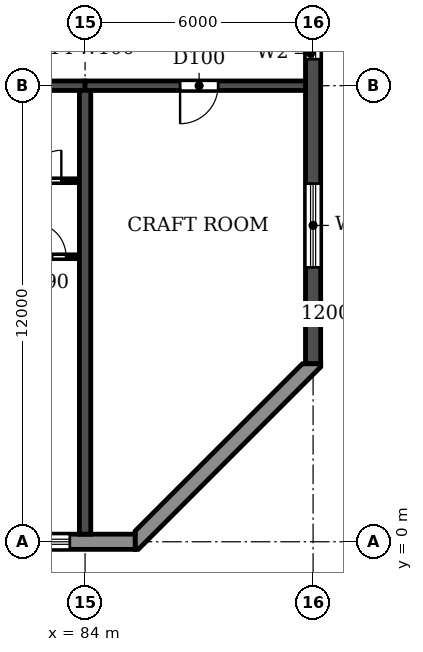
"""IFC4 building model, lengths in metres.
Left out: names, types, materials, properties, quantities, classifications, styles, units other than length and angle.
Written with IfcOpenShell. Run it as: python <this file> out.ifc"""

import sys

from ifc_helpers import new_model, si_unit, direction, frame, frame_2d, origin, place, context, subcontext, project, spatial, polyline, rectangle, outline, extrude, element, fill, save


model = new_model("IFC4")
c1 = context("Model", 3, precision=1e-05, world=origin(), true_north=direction((0.0, 1.0)))
c2 = subcontext(c1, "Body", "Model", "MODEL_VIEW")
j1 = project(units=[si_unit("LENGTHUNIT", "METRE"), si_unit("PLANEANGLEUNIT", "RADIAN")], contexts=[c1])
p1 = place(None, origin())
s1 = spatial("IfcSite", under=j1, at=p1, CompositionType="ELEMENT")
p2 = place(p1, origin())
s2 = spatial("IfcBuilding", under=s1, at=p2, CompositionType="ELEMENT")
p3 = place(p2, frame((0.0, 0.0, 125.7)))
s3 = spatial("IfcBuildingStorey", under=s2, at=p3, CompositionType="ELEMENT", Elevation=125.7)
p4 = place(p3, frame((84.0, 0.2, 0.0), z_axis=(0.0, 0.0, 1.0), x_axis=(0.0, 1.0, 0.0)))
e1 = element("IfcWall", 1, at=p4, inside=s3, PredefinedType="SHEAR", context=c2, shape_type="SweptSolid", body=[
    extrude(rectangle(XDim=11.675, YDim=0.3, at=frame_2d((5.837, 0.0))), origin(), (0.0, 0.0, 1.0), 3.07),
])
p5 = place(p3, frame((90.0, 4.683, 0.0), z_axis=(0.0, 0.0, 1.0), x_axis=(0.0, 1.0, 0.0)))
e2 = element("IfcWall", 2, at=p5, inside=s3, PredefinedType="SHEAR", context=c2, shape_type="SweptSolid", body=[
    extrude(rectangle(XDim=33.034, YDim=0.4, at=frame_2d((16.517, 0.0))), origin(), (0.0, 0.0, 1.0), 3.07),
])
p6 = place(p5, frame((23.817, 0.0, 0.9)))
e3 = element("IfcOpeningElement", 3, at=p6, cuts=e2, PredefinedType="OPENING", context=c2, shape_type="SweptSolid", body=[
    extrude(rectangle(XDim=1.2, YDim=1.5, at=frame_2d((0.6, 0.75))), frame((0.0, 0.21, 0.0), z_axis=(0.0, -1.0, 0.0), x_axis=(1.0, 0.0, 0.0)), (0.0, 0.0, 1.0), 0.42),
])
p7 = place(p5, frame((8.017, 0.0, 0.9)))
e4 = element("IfcOpeningElement", 4, at=p7, cuts=e2, PredefinedType="OPENING", context=c2, shape_type="SweptSolid", body=[
    extrude(rectangle(XDim=1.2, YDim=1.5, at=frame_2d((0.6, 0.75))), frame((0.0, 0.21, 0.0), z_axis=(0.0, -1.0, 0.0), x_axis=(1.0, 0.0, 0.0)), (0.0, 0.0, 1.0), 0.42),
])
p8 = place(p5, frame((28.293, 0.0, 0.6)))
e5 = element("IfcOpeningElement", 5, at=p8, cuts=e2, PredefinedType="OPENING", context=c2, shape_type="SweptSolid", body=[
    extrude(rectangle(XDim=2.2, YDim=1.8, at=frame_2d((1.1, 0.9))), frame((0.0, 0.21, 0.0), z_axis=(0.0, -1.0, 0.0), x_axis=(1.0, 0.0, 0.0)), (0.0, 0.0, 1.0), 0.42),
])
p9 = place(p5, frame((2.541, 0.0, 0.6)))
e6 = element("IfcOpeningElement", 6, at=p9, cuts=e2, PredefinedType="OPENING", context=c2, shape_type="SweptSolid", body=[
    extrude(rectangle(XDim=2.2, YDim=1.8, at=frame_2d((1.1, 0.9))), frame((0.0, 0.21, 0.0), z_axis=(0.0, -1.0, 0.0), x_axis=(1.0, 0.0, 0.0)), (0.0, 0.0, 1.0), 0.42),
])
p10 = place(p3, frame((78.0, 12.0, 0.0), z_axis=(0.0, 0.0, 1.0), x_axis=(1.0, 0.0, 0.0)))
e7 = element("IfcWall", 7, at=p10, inside=s3, PredefinedType="SHEAR", context=c2, shape_type="SweptSolid", body=[
    extrude(rectangle(XDim=6.0, YDim=0.25, at=frame_2d((3.0, 0.0))), origin(), (0.0, 0.0, 1.0), 2.47),
])
p11 = place(p10, frame((2.55, 0.0, 0.0)))
e8 = element("IfcOpeningElement", 8, at=p11, cuts=e7, PredefinedType="OPENING", context=c2, shape_type="SweptSolid", body=[
    extrude(rectangle(XDim=1.0, YDim=2.1, at=frame_2d((0.5, 1.05))), frame((0.0, 0.135, 0.0), z_axis=(0.0, -1.0, 0.0), x_axis=(1.0, 0.0, 0.0)), (0.0, 0.0, 1.0), 0.27),
])
p12 = place(p3, frame((84.0, 12.0, 0.0), z_axis=(0.0, 0.0, 1.0), x_axis=(1.0, 0.0, 0.0)))
e9 = element("IfcWall", 9, at=p12, inside=s3, PredefinedType="SHEAR", context=c2, shape_type="SweptSolid", body=[
    extrude(rectangle(XDim=5.8, YDim=0.25, at=frame_2d((2.9, 0.0))), origin(), (0.0, 0.0, 1.0), 2.47),
])
p13 = place(p12, frame((2.5, 0.0, 0.0)))
e10 = element("IfcOpeningElement", 10, at=p13, cuts=e9, PredefinedType="OPENING", context=c2, shape_type="SweptSolid", body=[
    extrude(rectangle(XDim=1.0, YDim=2.1, at=frame_2d((0.5, 1.05))), frame((0.0, 0.135, 0.0), z_axis=(0.0, -1.0, 0.0), x_axis=(1.0, 0.0, 0.0)), (0.0, 0.0, 1.0), 0.27),
])
p14 = place(p3, frame((16.683, 0.0, 0.0), z_axis=(0.0, 0.0, 1.0), x_axis=(1.0, 0.0, 0.0)))
e11 = element("IfcWall", 11, at=p14, inside=s3, PredefinedType="STANDARD", context=c2, shape_type="SweptSolid", body=[
    extrude(rectangle(XDim=68.634, YDim=0.4, at=frame_2d((34.317, 0.0))), origin(), (0.0, 0.0, 1.0), 3.07),
])
p15 = place(p14, frame((1.717, 0.0, 0.9)))
e12 = element("IfcOpeningElement", 12, at=p15, cuts=e11, PredefinedType="OPENING", context=c2, shape_type="SweptSolid", body=[
    extrude(rectangle(XDim=2.2, YDim=1.5, at=frame_2d((1.1, 0.75))), frame((0.0, 0.21, 0.0), z_axis=(0.0, -1.0, 0.0), x_axis=(1.0, 0.0, 0.0)), (0.0, 0.0, 1.0), 0.42),
])
p16 = place(p14, frame((4.717, 0.0, 0.9)))
e13 = element("IfcOpeningElement", 13, at=p16, cuts=e11, PredefinedType="OPENING", context=c2, shape_type="SweptSolid", body=[
    extrude(rectangle(XDim=2.2, YDim=1.5, at=frame_2d((1.1, 0.75))), frame((0.0, 0.21, 0.0), z_axis=(0.0, -1.0, 0.0), x_axis=(1.0, 0.0, 0.0)), (0.0, 0.0, 1.0), 0.42),
])
p17 = place(p14, frame((7.717, 0.0, 0.9)))
e14 = element("IfcOpeningElement", 14, at=p17, cuts=e11, PredefinedType="OPENING", context=c2, shape_type="SweptSolid", body=[
    extrude(rectangle(XDim=2.2, YDim=1.5, at=frame_2d((1.1, 0.75))), frame((0.0, 0.21, 0.0), z_axis=(0.0, -1.0, 0.0), x_axis=(1.0, 0.0, 0.0)), (0.0, 0.0, 1.0), 0.42),
])
p18 = place(p14, frame((10.717, 0.0, 0.9)))
e15 = element("IfcOpeningElement", 15, at=p18, cuts=e11, PredefinedType="OPENING", context=c2, shape_type="SweptSolid", body=[
    extrude(rectangle(XDim=2.2, YDim=1.5, at=frame_2d((1.1, 0.75))), frame((0.0, 0.21, 0.0), z_axis=(0.0, -1.0, 0.0), x_axis=(1.0, 0.0, 0.0)), (0.0, 0.0, 1.0), 0.42),
])
p19 = place(p14, frame((13.717, 0.0, 0.9)))
e16 = element("IfcOpeningElement", 16, at=p19, cuts=e11, PredefinedType="OPENING", context=c2, shape_type="SweptSolid", body=[
    extrude(rectangle(XDim=2.2, YDim=1.5, at=frame_2d((1.1, 0.75))), frame((0.0, 0.21, 0.0), z_axis=(0.0, -1.0, 0.0), x_axis=(1.0, 0.0, 0.0)), (0.0, 0.0, 1.0), 0.42),
])
p20 = place(p14, frame((16.717, 0.0, 0.9)))
e17 = element("IfcOpeningElement", 17, at=p20, cuts=e11, PredefinedType="OPENING", context=c2, shape_type="SweptSolid", body=[
    extrude(rectangle(XDim=2.2, YDim=1.5, at=frame_2d((1.1, 0.75))), frame((0.0, 0.21, 0.0), z_axis=(0.0, -1.0, 0.0), x_axis=(1.0, 0.0, 0.0)), (0.0, 0.0, 1.0), 0.42),
])
p21 = place(p14, frame((19.717, 0.0, 0.9)))
e18 = element("IfcOpeningElement", 18, at=p21, cuts=e11, PredefinedType="OPENING", context=c2, shape_type="SweptSolid", body=[
    extrude(rectangle(XDim=2.2, YDim=1.5, at=frame_2d((1.1, 0.75))), frame((0.0, 0.21, 0.0), z_axis=(0.0, -1.0, 0.0), x_axis=(1.0, 0.0, 0.0)), (0.0, 0.0, 1.0), 0.42),
])
p22 = place(p14, frame((22.917, 0.0, 0.0)))
e19 = element("IfcOpeningElement", 19, at=p22, cuts=e11, PredefinedType="OPENING", context=c2, shape_type="SweptSolid", body=[
    extrude(rectangle(XDim=1.8, YDim=2.4, at=frame_2d((0.9, 1.2))), frame((0.0, 0.21, 0.0), z_axis=(0.0, -1.0, 0.0), x_axis=(1.0, 0.0, 0.0)), (0.0, 0.0, 1.0), 0.42),
])
p23 = place(p14, frame((25.717, 0.0, 0.9)))
e20 = element("IfcOpeningElement", 20, at=p23, cuts=e11, PredefinedType="OPENING", context=c2, shape_type="SweptSolid", body=[
    extrude(rectangle(XDim=2.2, YDim=1.5, at=frame_2d((1.1, 0.75))), frame((0.0, 0.21, 0.0), z_axis=(0.0, -1.0, 0.0), x_axis=(1.0, 0.0, 0.0)), (0.0, 0.0, 1.0), 0.42),
])
p24 = place(p14, frame((28.717, 0.0, 0.9)))
e21 = element("IfcOpeningElement", 21, at=p24, cuts=e11, PredefinedType="OPENING", context=c2, shape_type="SweptSolid", body=[
    extrude(rectangle(XDim=2.2, YDim=1.5, at=frame_2d((1.1, 0.75))), frame((0.0, 0.21, 0.0), z_axis=(0.0, -1.0, 0.0), x_axis=(1.0, 0.0, 0.0)), (0.0, 0.0, 1.0), 0.42),
])
p25 = place(p14, frame((31.717, 0.0, 0.9)))
e22 = element("IfcOpeningElement", 22, at=p25, cuts=e11, PredefinedType="OPENING", context=c2, shape_type="SweptSolid", body=[
    extrude(rectangle(XDim=2.2, YDim=1.5, at=frame_2d((1.1, 0.75))), frame((0.0, 0.21, 0.0), z_axis=(0.0, -1.0, 0.0), x_axis=(1.0, 0.0, 0.0)), (0.0, 0.0, 1.0), 0.42),
])
p26 = place(p14, frame((34.917, 0.0, 0.0)))
e23 = element("IfcOpeningElement", 23, at=p26, cuts=e11, PredefinedType="OPENING", context=c2, shape_type="SweptSolid", body=[
    extrude(rectangle(XDim=1.8, YDim=2.4, at=frame_2d((0.9, 1.2))), frame((0.0, 0.21, 0.0), z_axis=(0.0, -1.0, 0.0), x_axis=(1.0, 0.0, 0.0)), (0.0, 0.0, 1.0), 0.42),
])
p27 = place(p14, frame((37.717, 0.0, 0.9)))
e24 = element("IfcOpeningElement", 24, at=p27, cuts=e11, PredefinedType="OPENING", context=c2, shape_type="SweptSolid", body=[
    extrude(rectangle(XDim=2.2, YDim=1.5, at=frame_2d((1.1, 0.75))), frame((0.0, 0.21, 0.0), z_axis=(0.0, -1.0, 0.0), x_axis=(1.0, 0.0, 0.0)), (0.0, 0.0, 1.0), 0.42),
])
p28 = place(p14, frame((40.717, 0.0, 0.9)))
e25 = element("IfcOpeningElement", 25, at=p28, cuts=e11, PredefinedType="OPENING", context=c2, shape_type="SweptSolid", body=[
    extrude(rectangle(XDim=2.2, YDim=1.5, at=frame_2d((1.1, 0.75))), frame((0.0, 0.21, 0.0), z_axis=(0.0, -1.0, 0.0), x_axis=(1.0, 0.0, 0.0)), (0.0, 0.0, 1.0), 0.42),
])
p29 = place(p14, frame((43.717, 0.0, 0.9)))
e26 = element("IfcOpeningElement", 26, at=p29, cuts=e11, PredefinedType="OPENING", context=c2, shape_type="SweptSolid", body=[
    extrude(rectangle(XDim=2.2, YDim=1.5, at=frame_2d((1.1, 0.75))), frame((0.0, 0.21, 0.0), z_axis=(0.0, -1.0, 0.0), x_axis=(1.0, 0.0, 0.0)), (0.0, 0.0, 1.0), 0.42),
])
p30 = place(p14, frame((46.917, 0.0, 0.0)))
e27 = element("IfcOpeningElement", 27, at=p30, cuts=e11, PredefinedType="OPENING", context=c2, shape_type="SweptSolid", body=[
    extrude(rectangle(XDim=1.8, YDim=2.4, at=frame_2d((0.9, 1.2))), frame((0.0, 0.21, 0.0), z_axis=(0.0, -1.0, 0.0), x_axis=(1.0, 0.0, 0.0)), (0.0, 0.0, 1.0), 0.42),
])
p31 = place(p14, frame((49.717, 0.0, 0.9)))
e28 = element("IfcOpeningElement", 28, at=p31, cuts=e11, PredefinedType="OPENING", context=c2, shape_type="SweptSolid", body=[
    extrude(rectangle(XDim=2.2, YDim=1.5, at=frame_2d((1.1, 0.75))), frame((0.0, 0.21, 0.0), z_axis=(0.0, -1.0, 0.0), x_axis=(1.0, 0.0, 0.0)), (0.0, 0.0, 1.0), 0.42),
])
p32 = place(p14, frame((52.717, 0.0, 0.9)))
e29 = element("IfcOpeningElement", 29, at=p32, cuts=e11, PredefinedType="OPENING", context=c2, shape_type="SweptSolid", body=[
    extrude(rectangle(XDim=2.2, YDim=1.5, at=frame_2d((1.1, 0.75))), frame((0.0, 0.21, 0.0), z_axis=(0.0, -1.0, 0.0), x_axis=(1.0, 0.0, 0.0)), (0.0, 0.0, 1.0), 0.42),
])
p33 = place(p14, frame((55.717, 0.0, 0.9)))
e30 = element("IfcOpeningElement", 30, at=p33, cuts=e11, PredefinedType="OPENING", context=c2, shape_type="SweptSolid", body=[
    extrude(rectangle(XDim=2.2, YDim=1.5, at=frame_2d((1.1, 0.75))), frame((0.0, 0.21, 0.0), z_axis=(0.0, -1.0, 0.0), x_axis=(1.0, 0.0, 0.0)), (0.0, 0.0, 1.0), 0.42),
])
p34 = place(p14, frame((58.917, 0.0, 0.0)))
e31 = element("IfcOpeningElement", 31, at=p34, cuts=e11, PredefinedType="OPENING", context=c2, shape_type="SweptSolid", body=[
    extrude(rectangle(XDim=1.8, YDim=2.4, at=frame_2d((0.9, 1.2))), frame((0.0, 0.21, 0.0), z_axis=(0.0, -1.0, 0.0), x_axis=(1.0, 0.0, 0.0)), (0.0, 0.0, 1.0), 0.42),
])
p35 = place(p14, frame((61.717, 0.0, 0.9)))
e32 = element("IfcOpeningElement", 32, at=p35, cuts=e11, PredefinedType="OPENING", context=c2, shape_type="SweptSolid", body=[
    extrude(rectangle(XDim=2.2, YDim=1.5, at=frame_2d((1.1, 0.75))), frame((0.0, 0.21, 0.0), z_axis=(0.0, -1.0, 0.0), x_axis=(1.0, 0.0, 0.0)), (0.0, 0.0, 1.0), 0.42),
])
p36 = place(p14, frame((64.717, 0.0, 0.9)))
e33 = element("IfcOpeningElement", 33, at=p36, cuts=e11, PredefinedType="OPENING", context=c2, shape_type="SweptSolid", body=[
    extrude(rectangle(XDim=2.2, YDim=1.5, at=frame_2d((1.1, 0.75))), frame((0.0, 0.21, 0.0), z_axis=(0.0, -1.0, 0.0), x_axis=(1.0, 0.0, 0.0)), (0.0, 0.0, 1.0), 0.42),
])
p37 = place(p3, origin())
e34 = element("IfcWall", 34, at=p37, inside=s3, PredefinedType="STANDARD", context=c2, shape_type="SweptSolid", body=[
    extrude(outline(polyline([(85.317, -0.2), (85.4, -0.2), (90.2, 4.6), (90.2, 4.683), (89.717, 4.683), (85.317, 0.283), (85.317, -0.2)])), origin(), (0.0, 0.0, 1.0), 3.07),
])
p38 = place(p3, frame((80.95, 7.5, 0.0), z_axis=(0.0, 0.0, 1.0), x_axis=(1.0, 0.0, 0.0)))
e35 = element("IfcWall", 35, at=p38, inside=s3, PredefinedType="PARTITIONING", context=c2, shape_type="SweptSolid", body=[
    extrude(rectangle(XDim=2.89, YDim=0.1, at=frame_2d((1.445, 0.0))), origin(), (0.0, 0.0, 1.0), 3.07),
])
p39 = place(p38, frame((1.65, 0.0, 0.0)))
e36 = element("IfcOpeningElement", 36, at=p39, cuts=e35, PredefinedType="OPENING", context=c2, shape_type="SweptSolid", body=[
    extrude(rectangle(XDim=0.9, YDim=2.1, at=frame_2d((0.45, 1.05))), frame((0.0, 0.06, 0.0), z_axis=(0.0, -1.0, 0.0), x_axis=(1.0, 0.0, 0.0)), (0.0, 0.0, 1.0), 0.12),
])
p40 = place(p3, frame((81.9, 9.5, 0.0), z_axis=(0.0, 0.0, 1.0), x_axis=(1.0, 0.0, 0.0)))
e37 = element("IfcWall", 37, at=p40, inside=s3, PredefinedType="PARTITIONING", context=c2, shape_type="SweptSolid", body=[
    extrude(rectangle(XDim=1.94, YDim=0.1, at=frame_2d((0.97, 0.0))), origin(), (0.0, 0.0, 1.0), 3.07),
])
p41 = place(p40, frame((0.675, 0.0, 0.0)))
e38 = element("IfcOpeningElement", 38, at=p41, cuts=e37, PredefinedType="OPENING", context=c2, shape_type="SweptSolid", body=[
    extrude(rectangle(XDim=0.8, YDim=2.1, at=frame_2d((0.4, 1.05))), frame((0.0, 0.06, 0.0), z_axis=(0.0, -1.0, 0.0), x_axis=(1.0, 0.0, 0.0)), (0.0, 0.0, 1.0), 0.12),
])
p42 = place(p36, origin())
e39 = element("IfcWindow", 39, at=p42, inside=s3, PartitioningType="DOUBLE_PANEL_HORIZONTAL", PredefinedType="WINDOW", context=c2, shape_type="SweptSolid", body=[
    extrude(rectangle(XDim=2.2, YDim=1.5, at=frame_2d((1.1, 0.75))), frame((0.0, 0.03, 0.0), z_axis=(0.0, -1.0, 0.0), x_axis=(1.0, 0.0, 0.0)), (0.0, 0.0, 1.0), 0.06),
])
fill(e33, e39)
p43 = place(p7, origin())
e40 = element("IfcWindow", 40, at=p43, inside=s3, PartitioningType="SINGLE_PANEL", PredefinedType="WINDOW", context=c2, shape_type="SweptSolid", body=[
    extrude(rectangle(XDim=1.2, YDim=1.5, at=frame_2d((0.6, 0.75))), frame((0.0, 0.03, 0.0), z_axis=(0.0, -1.0, 0.0), x_axis=(1.0, 0.0, 0.0)), (0.0, 0.0, 1.0), 0.06),
])
fill(e4, e40)
p44 = place(p9, origin())
e41 = element("IfcWindow", 41, at=p44, inside=s3, PartitioningType="DOUBLE_PANEL_HORIZONTAL", PredefinedType="WINDOW", context=c2, shape_type="SweptSolid", body=[
    extrude(rectangle(XDim=2.2, YDim=1.8, at=frame_2d((1.1, 0.9))), frame((0.0, 0.03, 0.0), z_axis=(0.0, -1.0, 0.0), x_axis=(1.0, 0.0, 0.0)), (0.0, 0.0, 1.0), 0.06),
])
fill(e6, e41)
p45 = place(p41, origin())
e42 = element("IfcDoor", 42, at=p45, inside=s3, OperationType="SINGLE_SWING_RIGHT", PredefinedType="DOOR", context=c2, shape_type="SweptSolid", body=[
    extrude(rectangle(XDim=0.8, YDim=2.1, at=frame_2d((0.4, 1.05))), frame((0.0, 0.025, 0.0), z_axis=(0.0, -1.0, 0.0), x_axis=(1.0, 0.0, 0.0)), (0.0, 0.0, 1.0), 0.05),
])
fill(e38, e42)
p46 = place(p39, origin())
e43 = element("IfcDoor", 43, at=p46, inside=s3, OperationType="SINGLE_SWING_LEFT", PredefinedType="DOOR", context=c2, shape_type="SweptSolid", body=[
    extrude(rectangle(XDim=0.9, YDim=2.1, at=frame_2d((0.45, 1.05))), frame((0.0, 0.025, 0.0), z_axis=(0.0, -1.0, 0.0), x_axis=(1.0, 0.0, 0.0)), (0.0, 0.0, 1.0), 0.05),
])
fill(e36, e43)
p47 = place(p13, frame((1.0, 0.0, 0.0), z_axis=(0.0, 0.0, 1.0), x_axis=(-1.0, 0.0, 0.0)))
e44 = element("IfcDoor", 44, at=p47, inside=s3, OperationType="SINGLE_SWING_RIGHT", PredefinedType="DOOR", context=c2, shape_type="SweptSolid", body=[
    extrude(rectangle(XDim=1.0, YDim=2.1, at=frame_2d((0.5, 1.05))), frame((0.0, 0.025, 0.0), z_axis=(0.0, -1.0, 0.0), x_axis=(1.0, 0.0, 0.0)), (0.0, 0.0, 1.0), 0.05),
])
fill(e10, e44)
save(model, sys.argv[1])
